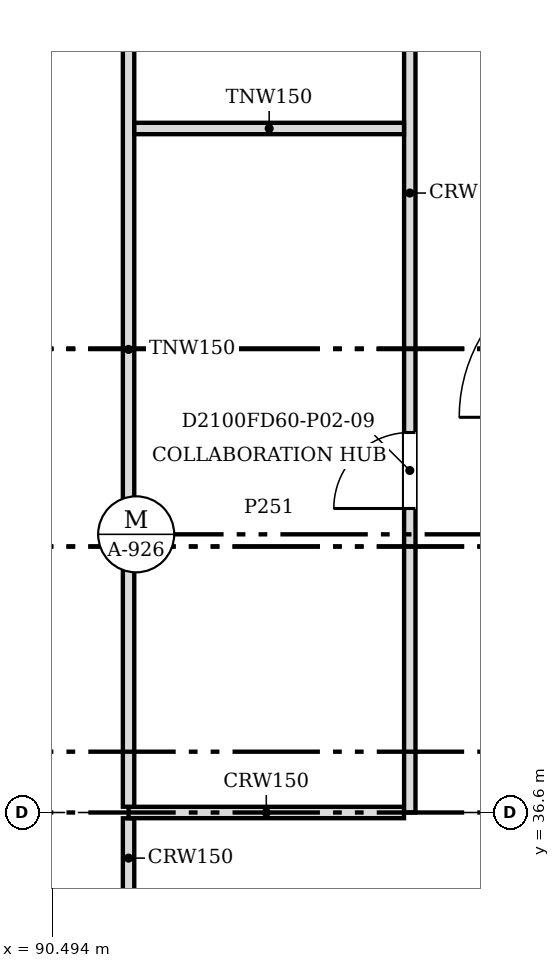
"""IFC4 building model, lengths in metres.
Left out: names, types, materials, properties, quantities, classifications, styles, units other than length and angle.
Written with IfcOpenShell. Run it as: python <this file> out.ifc"""

import sys

from ifc_helpers import new_model, si_unit, direction, frame, frame_2d, origin, place, context, subcontext, project, spatial, rectangle, extrude, source, transform, mapped, element, fill, save


model = new_model("IFC4")
c1 = context("Model", 3, precision=1e-05, world=origin(), true_north=direction((0.0, 1.0)))
c2 = subcontext(c1, "Body", "Model", "MODEL_VIEW")
j1 = project(units=[si_unit("LENGTHUNIT", "METRE"), si_unit("PLANEANGLEUNIT", "RADIAN")], contexts=[c1])
p1 = place(None, origin())
s1 = spatial("IfcSite", under=j1, at=p1, CompositionType="ELEMENT")
p2 = place(p1, origin())
s2 = spatial("IfcBuilding", under=s1, at=p2, CompositionType="ELEMENT")
p3 = place(p2, frame((0.0, 0.0, 7.2)))
s3 = spatial("IfcBuildingStorey", under=s2, at=p3, CompositionType="ELEMENT", Elevation=7.2)
p4 = place(p3, frame((91.5, 35.476, 0.0), z_axis=(0.0, 0.0, 1.0), x_axis=(0.0, 1.0, 0.0)))
e1 = element("IfcWall", 1, at=p4, inside=s3, PredefinedType="PARTITIONING", context=c2, shape_type="SweptSolid", body=[
    extrude(rectangle(XDim=1.048, YDim=0.15, at=frame_2d((0.524, 0.0))), origin(), (0.0, 0.0, 1.0), 3.715),
])
p5 = place(p3, frame((91.5, 36.6, 0.0), z_axis=(0.0, 0.0, 1.0), x_axis=(1.0, 0.0, 0.0)))
e2 = element("IfcWall", 2, at=p5, inside=s3, PredefinedType="PARTITIONING", context=c2, shape_type="SweptSolid", body=[
    extrude(rectangle(XDim=3.624, YDim=0.15, at=frame_2d((1.812, 0.0))), origin(), (0.0, 0.0, 1.0), 3.715),
])
p6 = place(p3, frame((95.2, 36.6, 0.0), z_axis=(0.0, 0.0, 1.0), x_axis=(0.0, 1.0, 0.0)))
e3 = element("IfcWall", 3, at=p6, inside=s3, PredefinedType="PARTITIONING", context=c2, shape_type="SweptSolid", body=[
    extrude(rectangle(XDim=14.6, YDim=0.15, at=frame_2d((7.3, 0.0))), origin(), (0.0, 0.0, 1.0), 3.715),
])
m1 = source(origin(), c2, "Body", "SweptSolid", [
    extrude(rectangle(XDim=1.0, YDim=2.1, at=frame_2d((0.5, 1.05))), frame((0.0, 0.085, 0.0), z_axis=(0.0, -1.0, 0.0), x_axis=(1.0, 0.0, 0.0)), (0.0, 0.0, 1.0), 0.17),
])
p7 = place(p6, frame((11.301, 0.0, 0.0)))
e4 = element("IfcOpeningElement", 4, at=p7, cuts=e3, PredefinedType="OPENING", context=c2, shape_type="MappedRepresentation", body=[
    mapped(m1, transform((0.0, 0.0, 0.0), scale=1.0)),
])
p8 = place(p6, frame((4.0, 0.0, 0.0)))
e5 = element("IfcOpeningElement", 5, at=p8, cuts=e3, PredefinedType="OPENING", context=c2, shape_type="MappedRepresentation", body=[
    mapped(m1, transform((0.0, 0.0, 0.0), scale=1.0)),
])
p9 = place(p3, frame((91.5, 36.676, 0.0), z_axis=(0.0, 0.0, 1.0), x_axis=(0.0, 1.0, 0.0)))
e6 = element("IfcWall", 6, at=p9, inside=s3, PredefinedType="PARTITIONING", context=c2, shape_type="SweptSolid", body=[
    extrude(rectangle(XDim=12.034, YDim=0.15, at=frame_2d((6.017, 0.0))), origin(), (0.0, 0.0, 1.0), 3.715),
])
p10 = place(p3, frame((91.576, 45.6, 0.0), z_axis=(0.0, 0.0, 1.0), x_axis=(1.0, 0.0, 0.0)))
e7 = element("IfcWall", 7, at=p10, inside=s3, PredefinedType="PARTITIONING", context=c2, shape_type="SweptSolid", body=[
    extrude(rectangle(XDim=3.548, YDim=0.15, at=frame_2d((1.774, 0.0))), origin(), (0.0, 0.0, 1.0), 3.715),
])
m2 = source(origin(), c2, "Body", "SweptSolid", [
    extrude(rectangle(XDim=1.0, YDim=2.1, at=frame_2d((0.5, 1.05))), frame((0.0, 0.025, 0.0), z_axis=(0.0, -1.0, 0.0), x_axis=(1.0, 0.0, 0.0)), (0.0, 0.0, 1.0), 0.05),
])
p11 = place(p8, origin())
e8 = element("IfcDoor", 8, at=p11, inside=s3, OperationType="SINGLE_SWING_LEFT", PredefinedType="DOOR", context=c2, shape_type="MappedRepresentation", body=[
    mapped(m2, transform((0.0, 0.0, 0.0), scale=1.0)),
])
fill(e5, e8)
save(model, sys.argv[1])
